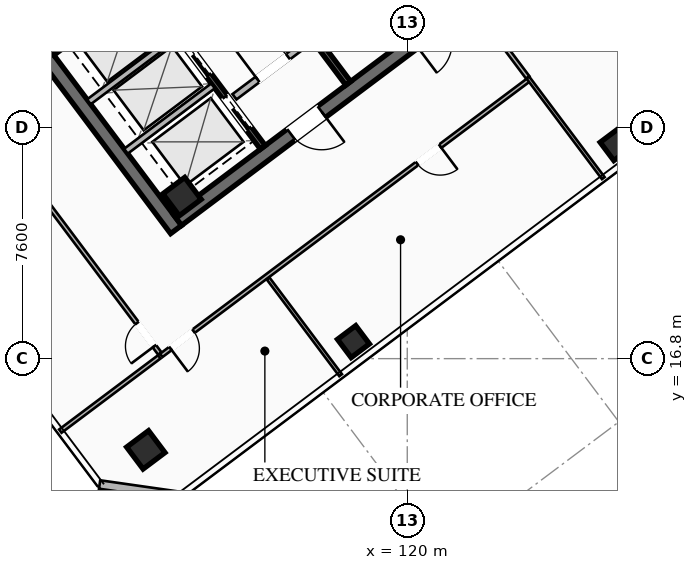
"""IFC4 building model, lengths in metres.
Left out: names, types, materials, properties, quantities, classifications, styles, units other than length and angle.
Written with IfcOpenShell. Run it as: python <this file> out.ifc"""

import sys

from ifc_helpers import new_model, si_unit, direction, frame, frame_2d, origin, origin_2d, place, context, subcontext, project, spatial, rectangle, hollow_rectangle, extrude, element, fill, save


model = new_model("IFC4")
c1 = context("Model", 3, precision=1e-05, world=origin(), true_north=direction((0.0, 1.0)))
c2 = subcontext(c1, "Body", "Model", "MODEL_VIEW")
j1 = project(units=[si_unit("LENGTHUNIT", "METRE"), si_unit("PLANEANGLEUNIT", "RADIAN")], contexts=[c1])
p1 = place(None, origin())
s1 = spatial("IfcSite", under=j1, at=p1, CompositionType="ELEMENT")
p2 = place(p1, origin())
s2 = spatial("IfcBuilding", under=s1, at=p2, CompositionType="ELEMENT")
p3 = place(p2, frame((0.0, 0.0, 251.4)))
s3 = spatial("IfcBuildingStorey", under=s2, at=p3, CompositionType="ELEMENT", Elevation=251.4)
p4 = place(p3, frame((112.396, 21.047, 0.0), z_axis=(0.0, 0.0, 1.0), x_axis=(-0.600005007985, 0.799996243986, 0.0)))
e1 = element("IfcWall", 1, at=p4, inside=s3, PredefinedType="SHEAR", context=c2, shape_type="SweptSolid", body=[
    extrude(rectangle(XDim=15.6, YDim=0.45, at=frame_2d((7.8, 0.0))), origin(), (0.0, 0.0, 1.0), 4.0),
])
p5 = place(p3, frame((124.649, 30.518, 0.0), z_axis=(0.0, 0.0, 1.0), x_axis=(-0.8, -0.6, 0.0)))
e2 = element("IfcWall", 2, at=p5, inside=s3, PredefinedType="SHEAR", context=c2, shape_type="SweptSolid", body=[
    extrude(rectangle(XDim=15.26, YDim=0.45, at=frame_2d((7.63, 0.0))), origin(), (0.0, 0.0, 1.0), 4.0),
])
p6 = place(p5, frame((9.33, 0.0, 0.0)))
e3 = element("IfcOpeningElement", 3, at=p6, cuts=e2, PredefinedType="OPENING", context=c2, shape_type="SweptSolid", body=[
    extrude(rectangle(XDim=1.25, YDim=2.25, at=frame_2d((0.625, 1.125))), frame((0.0, 0.235, 0.0), z_axis=(0.0, -1.0, 0.0), x_axis=(1.0, 0.0, 0.0)), (0.0, 0.0, 1.0), 0.47),
])
p7 = place(p5, frame((4.28, 0.0, 0.0)))
e4 = element("IfcOpeningElement", 4, at=p7, cuts=e2, PredefinedType="OPENING", context=c2, shape_type="SweptSolid", body=[
    extrude(rectangle(XDim=1.25, YDim=2.25, at=frame_2d((0.625, 1.125))), frame((0.0, 0.235, 0.0), z_axis=(0.0, -1.0, 0.0), x_axis=(1.0, 0.0, 0.0)), (0.0, 0.0, 1.0), 0.47),
])
for number, where, z_axis, x_axis in (
    (5, (112.59, 22.13, 0.0), (0.0, 0.0, 1.0), (0.8, 0.6, 0.0)),
    (6, (111.4, 13.8, 0.0), (0.0, 0.0, 1.0), (0.8, 0.6, 0.0)),
):
    element("IfcColumn", number, at=place(p3, frame(where, z_axis=z_axis, x_axis=x_axis)), inside=s3, PredefinedType="COLUMN", context=c2, shape_type="SweptSolid", body=[
        extrude(hollow_rectangle(XDim=0.9, YDim=0.9, WallThickness=0.04, at=origin_2d()), origin(), (0.0, 0.0, 1.0), 3.78),
    ])
for number, where, z_axis, x_axis in (
    (7, (118.23, 17.36, 0.0), (0.0, 0.0, 1.0), (0.8, 0.6, 0.0)),
    (8, (126.87, 23.84, 0.0), (0.0, 0.0, 1.0), (0.8, 0.6, 0.0)),
):
    element("IfcColumn", number, at=place(p3, frame(where, z_axis=z_axis, x_axis=x_axis)), inside=s3, PredefinedType="COLUMN", context=c2, shape_type="SweptSolid", body=[
        extrude(hollow_rectangle(XDim=0.75, YDim=0.75, WallThickness=0.032, at=origin_2d()), origin(), (0.0, 0.0, 1.0), 3.78),
    ])
p8 = place(p3, frame((112.54, 12.28, 0.0), z_axis=(0.0, 0.0, 1.0), x_axis=(-0.989956760759, 0.141370477216, 0.0)))
e9 = element("IfcWall", 9, at=p8, inside=s3, PredefinedType="SOLIDWALL", context=c2, shape_type="SweptSolid", body=[
    extrude(rectangle(XDim=2.687, YDim=0.28, at=frame_2d((1.344, 0.0))), origin(), (0.0, 0.0, 1.0), 3.78),
])
p9 = place(p3, frame((108.316, 26.862, 0.0), z_axis=(0.0, 0.0, 1.0), x_axis=(0.800014909178, 0.599980120581, 0.0)))
e10 = element("IfcWall", 10, at=p9, inside=s3, PredefinedType="SHEAR", context=c2, shape_type="SweptSolid", body=[
    extrude(rectangle(XDim=3.93, YDim=0.2, at=frame_2d((1.965, 0.0))), origin(), (0.0, 0.0, 1.0), 3.78),
])
p10 = place(p3, frame((118.058, 25.856, 0.0), z_axis=(0.0, 0.0, 1.0), x_axis=(-0.600002657301, 0.799998007018, 0.0)))
e11 = element("IfcWall", 11, at=p10, inside=s3, PredefinedType="SHEAR", context=c2, shape_type="SweptSolid", body=[
    extrude(rectangle(XDim=14.7, YDim=0.2, at=frame_2d((7.35, 0.0))), origin(), (0.0, 0.0, 1.0), 3.78),
])
p11 = place(p3, frame((114.316, 25.412, 0.0), z_axis=(0.0, 0.0, 1.0), x_axis=(0.800018601094, 0.59997519774, 0.0)))
e12 = element("IfcWall", 12, at=p11, inside=s3, PredefinedType="SOLIDWALL", context=c2, shape_type="SweptSolid", body=[
    extrude(rectangle(XDim=3.15, YDim=0.22, at=frame_2d((1.575, 0.0))), origin(), (0.0, 0.0, 1.0), 2.971),
])
p12 = place(p11, frame((0.95, 0.0, 0.0)))
e13 = element("IfcOpeningElement", 13, at=p12, cuts=e12, PredefinedType="OPENING", context=c2, shape_type="SweptSolid", body=[
    extrude(rectangle(XDim=1.25, YDim=2.25, at=frame_2d((0.625, 1.125))), frame((0.0, 0.12, 0.0), z_axis=(0.0, -1.0, 0.0), x_axis=(1.0, 0.0, 0.0)), (0.0, 0.0, 1.0), 0.24),
])
p13 = place(p3, frame((115.25, 23.75, 0.0), z_axis=(0.0, 0.0, 1.0), x_axis=(-0.599994036198, 0.800004472816, 0.0)))
e14 = element("IfcWall", 14, at=p13, inside=s3, PredefinedType="SHEAR", context=c2, shape_type="SweptSolid", body=[
    extrude(rectangle(XDim=6.55, YDim=0.2, at=frame_2d((3.275, 0.0))), origin(), (0.0, 0.0, 1.0), 3.78),
])
p14 = place(p13, frame((4.975, 0.0, 0.0)))
e15 = element("IfcOpeningElement", 15, at=p14, cuts=e14, PredefinedType="OPENING", context=c2, shape_type="SweptSolid", body=[
    extrude(rectangle(XDim=1.3, YDim=2.25, at=frame_2d((0.65, 1.125))), frame((0.0, 0.11, 0.0), z_axis=(0.0, -1.0, 0.0), x_axis=(1.0, 0.0, 0.0)), (0.0, 0.0, 1.0), 0.22),
])
p15 = place(p13, frame((2.975, 0.0, 0.0)))
e16 = element("IfcOpeningElement", 16, at=p15, cuts=e14, PredefinedType="OPENING", context=c2, shape_type="SweptSolid", body=[
    extrude(rectangle(XDim=1.3, YDim=2.25, at=frame_2d((0.65, 1.125))), frame((0.0, 0.11, 0.0), z_axis=(0.0, -1.0, 0.0), x_axis=(1.0, 0.0, 0.0)), (0.0, 0.0, 1.0), 0.22),
])
p16 = place(p13, frame((0.775, 0.0, 0.0)))
e17 = element("IfcOpeningElement", 17, at=p16, cuts=e14, PredefinedType="OPENING", context=c2, shape_type="SweptSolid", body=[
    extrude(rectangle(XDim=1.3, YDim=2.25, at=frame_2d((0.65, 1.125))), frame((0.0, 0.11, 0.0), z_axis=(0.0, -1.0, 0.0), x_axis=(1.0, 0.0, 0.0)), (0.0, 0.0, 1.0), 0.22),
])
for number, where, z_axis, x_axis in (
    (18, (110.746, 23.622, 0.0), (0.0, 0.0, 1.0), (0.8, 0.6, 0.0)),
    (19, (109.528, 25.246, 0.0), (0.0, 0.0, 1.0), (0.8, 0.6, 0.0)),
):
    element("IfcWall", number, at=place(p3, frame(where, z_axis=z_axis, x_axis=x_axis)), inside=s3, PredefinedType="SOLIDWALL", context=c2, shape_type="SweptSolid", body=[
        extrude(rectangle(XDim=3.58, YDim=0.2, at=frame_2d((1.79, 0.0))), origin(), (0.0, 0.0, 1.0), 3.78),
    ])
p17 = place(p3, frame((124.012, 25.984, 0.0), z_axis=(0.0, 0.0, 1.0), x_axis=(-0.800003872688, -0.599994836382, 0.0)))
e20 = element("IfcWall", 20, at=p17, inside=s3, PredefinedType="PARTITIONING", context=c2, shape_type="SweptSolid", body=[
    extrude(rectangle(XDim=15.13, YDim=0.135, at=frame_2d((7.565, 0.0))), origin(), (0.0, 0.0, 1.0), 2.971),
])
p18 = place(p17, frame((13.8, 0.0, 0.0)))
e21 = element("IfcOpeningElement", 21, at=p18, cuts=e20, PredefinedType="OPENING", context=c2, shape_type="SweptSolid", body=[
    extrude(rectangle(XDim=0.95, YDim=2.05, at=frame_2d((0.475, 1.025))), frame((0.0, 0.077, 0.0), z_axis=(0.0, -1.0, 0.0), x_axis=(1.0, 0.0, 0.0)), (0.0, 0.0, 1.0), 0.155),
])
p19 = place(p17, frame((3.663, 0.0, 0.0)))
e22 = element("IfcOpeningElement", 22, at=p19, cuts=e20, PredefinedType="OPENING", context=c2, shape_type="SweptSolid", body=[
    extrude(rectangle(XDim=0.95, YDim=2.05, at=frame_2d((0.475, 1.025))), frame((0.0, 0.077, 0.0), z_axis=(0.0, -1.0, 0.0), x_axis=(1.0, 0.0, 0.0)), (0.0, 0.0, 1.0), 0.155),
])
p20 = place(p3, frame((122.248, 28.336, 0.0), z_axis=(0.0, 0.0, 1.0), x_axis=(0.600040975122, -0.799969267018, 0.0)))
e23 = element("IfcWall", 23, at=p20, inside=s3, PredefinedType="PARTITIONING", context=c2, shape_type="SweptSolid", body=[
    extrude(rectangle(XDim=2.86, YDim=0.135, at=frame_2d((1.43, 0.0))), origin(), (0.0, 0.0, 1.0), 2.971),
])
p21 = place(p20, frame((0.25, 0.0, 0.0)))
e24 = element("IfcOpeningElement", 24, at=p21, cuts=e23, PredefinedType="OPENING", context=c2, shape_type="SweptSolid", body=[
    extrude(rectangle(XDim=0.95, YDim=2.05, at=frame_2d((0.475, 1.025))), frame((0.0, 0.077, 0.0), z_axis=(0.0, -1.0, 0.0), x_axis=(1.0, 0.0, 0.0)), (0.0, 0.0, 1.0), 0.155),
])
p22 = place(p3, frame((117.808, 16.256, 0.0), z_axis=(0.0, 0.0, 1.0), x_axis=(-0.600049072604, 0.799963193195, 0.0)))
e25 = element("IfcWall", 25, at=p22, inside=s3, PredefinedType="PARTITIONING", context=c2, shape_type="SweptSolid", body=[
    extrude(rectangle(XDim=3.98, YDim=0.11, at=frame_2d((1.99, 0.0))), origin(), (0.0, 0.0, 1.0), 2.971),
])
p23 = place(p3, frame((126.448, 22.736, 0.0), z_axis=(0.0, 0.0, 1.0), x_axis=(-0.599981128793, 0.800014153057, 0.0)))
e26 = element("IfcWall", 26, at=p23, inside=s3, PredefinedType="PARTITIONING", context=c2, shape_type="SweptSolid", body=[
    extrude(rectangle(XDim=4.14, YDim=0.11, at=frame_2d((2.07, 0.0))), origin(), (0.0, 0.0, 1.0), 2.971),
])
p24 = place(p3, frame((111.86, 16.97, 0.0), z_axis=(0.0, 0.0, 1.0), x_axis=(-0.60000194242, 0.799998543181, 0.0)))
e27 = element("IfcWall", 27, at=p24, inside=s3, PredefinedType="PARTITIONING", context=c2, shape_type="SweptSolid", body=[
    extrude(rectangle(XDim=20.11, YDim=0.135, at=frame_2d((10.055, 0.0))), origin(), (0.0, 0.0, 1.0), 2.971),
])
p25 = place(p24, frame((0.3, 0.0, 0.0)))
e28 = element("IfcOpeningElement", 28, at=p25, cuts=e27, PredefinedType="OPENING", context=c2, shape_type="SweptSolid", body=[
    extrude(rectangle(XDim=0.95, YDim=2.05, at=frame_2d((0.475, 1.025))), frame((0.0, 0.077, 0.0), z_axis=(0.0, -1.0, 0.0), x_axis=(1.0, 0.0, 0.0)), (0.0, 0.0, 1.0), 0.155),
])
p26 = place(p3, frame((108.588, 14.416, 0.0), z_axis=(0.0, 0.0, 1.0), x_axis=(0.800021594126, 0.599971206752, 0.0)))
e29 = element("IfcWall", 29, at=p26, inside=s3, PredefinedType="PARTITIONING", context=c2, shape_type="SweptSolid", body=[
    extrude(rectangle(XDim=4.07, YDim=0.135, at=frame_2d((2.035, 0.0))), origin(), (0.0, 0.0, 1.0), 2.971),
])
p27 = place(p6, origin())
e30 = element("IfcDoor", 30, at=p27, inside=s3, OperationType="SINGLE_SWING_LEFT", PredefinedType="DOOR", context=c2, shape_type="SweptSolid", body=[
    extrude(rectangle(XDim=1.25, YDim=2.25, at=frame_2d((0.625, 1.125))), frame((0.0, 0.025, 0.0), z_axis=(0.0, -1.0, 0.0), x_axis=(1.0, 0.0, 0.0)), (0.0, 0.0, 1.0), 0.05),
])
fill(e3, e30)
p28 = place(p12, origin())
e31 = element("IfcDoor", 31, at=p28, inside=s3, OperationType="SINGLE_SWING_LEFT", PredefinedType="DOOR", context=c2, shape_type="SweptSolid", body=[
    extrude(rectangle(XDim=1.25, YDim=2.25, at=frame_2d((0.625, 1.125))), frame((0.0, 0.025, 0.0), z_axis=(0.0, -1.0, 0.0), x_axis=(1.0, 0.0, 0.0)), (0.0, 0.0, 1.0), 0.05),
])
fill(e13, e31)
p29 = place(p18, origin())
e32 = element("IfcDoor", 32, at=p29, inside=s3, OperationType="SINGLE_SWING_RIGHT", PredefinedType="DOOR", context=c2, shape_type="SweptSolid", body=[
    extrude(rectangle(XDim=0.95, YDim=2.05, at=frame_2d((0.475, 1.025))), frame((0.0, 0.025, 0.0), z_axis=(0.0, -1.0, 0.0), x_axis=(1.0, 0.0, 0.0)), (0.0, 0.0, 1.0), 0.05),
])
fill(e21, e32)
p30 = place(p19, origin())
e33 = element("IfcDoor", 33, at=p30, inside=s3, OperationType="SINGLE_SWING_LEFT", PredefinedType="DOOR", context=c2, shape_type="SweptSolid", body=[
    extrude(rectangle(XDim=0.95, YDim=2.05, at=frame_2d((0.475, 1.025))), frame((0.0, 0.025, 0.0), z_axis=(0.0, -1.0, 0.0), x_axis=(1.0, 0.0, 0.0)), (0.0, 0.0, 1.0), 0.05),
])
fill(e22, e33)
p31 = place(p25, origin())
e34 = element("IfcDoor", 34, at=p31, inside=s3, OperationType="SINGLE_SWING_LEFT", PredefinedType="DOOR", context=c2, shape_type="SweptSolid", body=[
    extrude(rectangle(XDim=0.95, YDim=2.05, at=frame_2d((0.475, 1.025))), frame((0.0, 0.025, 0.0), z_axis=(0.0, -1.0, 0.0), x_axis=(1.0, 0.0, 0.0)), (0.0, 0.0, 1.0), 0.05),
])
fill(e28, e34)
p32 = place(p15, origin())
e35 = element("IfcDoor", 35, at=p32, inside=s3, OperationType="SLIDING_TO_LEFT", PredefinedType="DOOR", context=c2, shape_type="SweptSolid", body=[
    extrude(rectangle(XDim=1.3, YDim=2.25, at=frame_2d((0.65, 1.125))), frame((0.0, 0.025, 0.0), z_axis=(0.0, -1.0, 0.0), x_axis=(1.0, 0.0, 0.0)), (0.0, 0.0, 1.0), 0.05),
])
fill(e16, e35)
p33 = place(p16, origin())
e36 = element("IfcDoor", 36, at=p33, inside=s3, OperationType="SLIDING_TO_LEFT", PredefinedType="DOOR", context=c2, shape_type="SweptSolid", body=[
    extrude(rectangle(XDim=1.3, YDim=2.25, at=frame_2d((0.65, 1.125))), frame((0.0, 0.025, 0.0), z_axis=(0.0, -1.0, 0.0), x_axis=(1.0, 0.0, 0.0)), (0.0, 0.0, 1.0), 0.05),
])
fill(e17, e36)
save(model, sys.argv[1])
